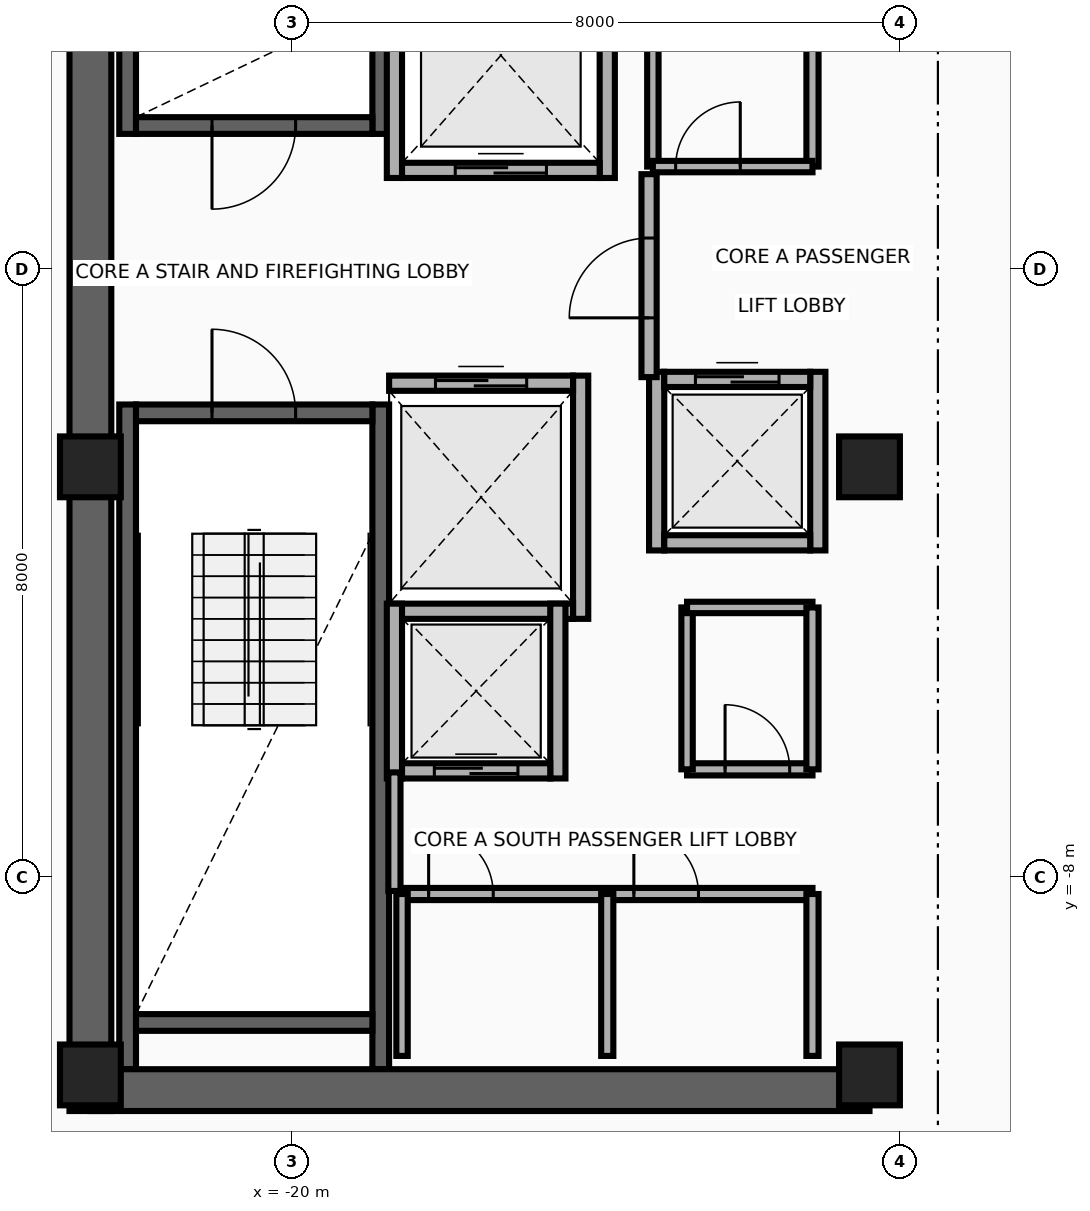
"""IFC4 building model, lengths in metres.
Left out: names, types, materials, properties, quantities, classifications, styles, units other than length and angle.
Written with IfcOpenShell. Run it as: python <this file> out.ifc"""

import sys

from ifc_helpers import new_model, si_unit, direction, frame, frame_2d, origin, origin_2d, place, context, subcontext, project, spatial, rectangle, extrude, source, transform, mapped, element, fill, save


model = new_model("IFC4")
c1 = context("Model", 3, precision=1e-05, world=origin(), true_north=direction((0.0, 1.0)))
c2 = subcontext(c1, "Body", "Model", "MODEL_VIEW")
j1 = project(units=[si_unit("LENGTHUNIT", "METRE"), si_unit("PLANEANGLEUNIT", "RADIAN")], contexts=[c1])
p1 = place(None, origin())
s1 = spatial("IfcSite", under=j1, at=p1, CompositionType="ELEMENT")
p2 = place(p1, origin())
s2 = spatial("IfcBuilding", under=s1, at=p2, CompositionType="ELEMENT")
p3 = place(p2, frame((0.0, 0.0, 273.0)))
s3 = spatial("IfcBuildingStorey", under=s2, at=p3, CompositionType="ELEMENT", Elevation=273.0)
for number, where, z_axis, x_axis in (
    (1, (-22.16, 1.78, 0.0), (0.0, 0.0, 1.0), (0.0, 1.0, 0.0)),
    (2, (-18.83, 1.78, 0.0), (0.0, 0.0, 1.0), (0.0, 1.0, 0.0)),
):
    element("IfcWall", number, at=place(p3, frame(where, z_axis=z_axis, x_axis=x_axis)), inside=s3, PredefinedType="SHEAR", context=c2, shape_type="SweptSolid", body=[
        extrude(rectangle(XDim=8.745, YDim=0.22, at=frame_2d((4.373, 0.0))), origin(), (0.0, 0.0, 1.0), 3.26),
    ])
p4 = place(p3, frame((-22.05, 1.89, 0.0), z_axis=(0.0, 0.0, 1.0), x_axis=(1.0, 0.0, 0.0)))
e3 = element("IfcWall", 3, at=p4, inside=s3, PredefinedType="SHEAR", context=c2, shape_type="SweptSolid", body=[
    extrude(rectangle(XDim=3.11, YDim=0.22, at=frame_2d((1.555, 0.0))), origin(), (0.0, 0.0, 1.0), 3.26),
])
p5 = place(p4, frame((1.0, 0.0, 0.0)))
e4 = element("IfcOpeningElement", 4, at=p5, cuts=e3, PredefinedType="OPENING", context=c2, shape_type="SweptSolid", body=[
    extrude(rectangle(XDim=1.1, YDim=2.15, at=frame_2d((0.55, 1.075))), frame((0.0, 0.125, 0.0), z_axis=(0.0, -1.0, 0.0), x_axis=(1.0, 0.0, 0.0)), (0.0, 0.0, 1.0), 0.25),
])
for number, where, z_axis, x_axis in (
    (5, (-22.16, -10.525, 0.0), (0.0, 0.0, 1.0), (0.0, 1.0, 0.0)),
    (6, (-18.83, -10.525, 0.0), (0.0, 0.0, 1.0), (0.0, 1.0, 0.0)),
):
    element("IfcWall", number, at=place(p3, frame(where, z_axis=z_axis, x_axis=x_axis)), inside=s3, PredefinedType="SHEAR", context=c2, shape_type="SweptSolid", body=[
        extrude(rectangle(XDim=8.745, YDim=0.22, at=frame_2d((4.373, 0.0))), origin(), (0.0, 0.0, 1.0), 3.26),
    ])
p6 = place(p3, frame((-22.05, -9.91, 0.0), z_axis=(0.0, 0.0, 1.0), x_axis=(1.0, 0.0, 0.0)))
e7 = element("IfcWall", 7, at=p6, inside=s3, PredefinedType="SHEAR", context=c2, shape_type="SweptSolid", body=[
    extrude(rectangle(XDim=3.11, YDim=0.22, at=frame_2d((1.555, 0.0))), origin(), (0.0, 0.0, 1.0), 3.26),
])
p7 = place(p3, frame((-22.05, -1.89, 0.0), z_axis=(0.0, 0.0, 1.0), x_axis=(1.0, 0.0, 0.0)))
e8 = element("IfcWall", 8, at=p7, inside=s3, PredefinedType="SHEAR", context=c2, shape_type="SweptSolid", body=[
    extrude(rectangle(XDim=3.11, YDim=0.22, at=frame_2d((1.555, 0.0))), origin(), (0.0, 0.0, 1.0), 3.26),
])
p8 = place(p7, frame((1.0, 0.0, 0.0)))
e9 = element("IfcOpeningElement", 9, at=p8, cuts=e8, PredefinedType="OPENING", context=c2, shape_type="SweptSolid", body=[
    extrude(rectangle(XDim=1.1, YDim=2.15, at=frame_2d((0.55, 1.075))), frame((0.0, 0.125, 0.0), z_axis=(0.0, -1.0, 0.0), x_axis=(1.0, 0.0, 0.0)), (0.0, 0.0, 1.0), 0.25),
])
p9 = place(p3, frame((-22.65, -11.075, 0.0), z_axis=(0.0, 0.0, 1.0), x_axis=(0.0, 1.0, 0.0)))
e10 = element("IfcWall", 10, at=p9, inside=s3, PredefinedType="SHEAR", context=c2, shape_type="SweptSolid", body=[
    extrude(rectangle(XDim=22.15, YDim=0.55, at=frame_2d((11.075, 0.0))), origin(), (0.0, 0.0, 1.0), 3.26),
])
p10 = place(p3, frame((-22.65, -10.8, 0.0), z_axis=(0.0, 0.0, 1.0), x_axis=(1.0, 0.0, 0.0)))
e11 = element("IfcWall", 11, at=p10, inside=s3, PredefinedType="SHEAR", context=c2, shape_type="SweptSolid", body=[
    extrude(rectangle(XDim=10.25, YDim=0.55, at=frame_2d((5.125, 0.0))), origin(), (0.0, 0.0, 1.0), 3.26),
])
m1 = source(origin(), c2, "Body", "SweptSolid", [
    extrude(rectangle(XDim=0.8, YDim=0.8, at=origin_2d()), origin(), (0.0, 0.0, 1.0), 3.5),
])
for number, where, z_axis, x_axis in (
    (12, (-22.65, -10.6, 0.0), (0.0, 0.0, 1.0), (1.0, 0.0, 0.0)),
    (13, (-12.4, -10.6, 0.0), (0.0, 0.0, 1.0), (1.0, 0.0, 0.0)),
    (14, (-22.65, -2.6, 0.0), (0.0, 0.0, 1.0), (1.0, 0.0, 0.0)),
    (15, (-12.4, -2.6, 0.0), (0.0, 0.0, 1.0), (1.0, 0.0, 0.0)),
):
    element("IfcColumn", number, at=place(p3, frame(where, z_axis=z_axis, x_axis=x_axis)), inside=s3, PredefinedType="COLUMN", context=c2, shape_type="MappedRepresentation", body=[
        mapped(m1, transform((0.0, 0.0, 0.0), x_axis=(1.0, 0.0, 0.0), y_axis=(0.0, 1.0, 0.0), z_axis=(0.0, 0.0, 1.0), scale=1.0)),
    ])
for number, where, z_axis, x_axis in (
    (16, (-18.65, 1.2, 0.0), (0.0, 0.0, 1.0), (0.0, 1.0, 0.0)),
    (17, (-15.85, 1.2, 0.0), (0.0, 0.0, 1.0), (0.0, 1.0, 0.0)),
):
    element("IfcWall", number, at=place(p3, frame(where, z_axis=z_axis, x_axis=x_axis)), inside=s3, PredefinedType="MOVABLE", context=c2, shape_type="SweptSolid", body=[
        extrude(rectangle(XDim=3.225, YDim=0.2, at=frame_2d((1.613, 0.0))), origin(), (0.0, 0.0, 1.0), 3.26),
    ])
p11 = place(p3, frame((-18.55, 1.3, 0.0), z_axis=(0.0, 0.0, 1.0), x_axis=(1.0, 0.0, 0.0)))
e18 = element("IfcWall", 18, at=p11, inside=s3, PredefinedType="MOVABLE", context=c2, shape_type="SweptSolid", body=[
    extrude(rectangle(XDim=2.6, YDim=0.2, at=frame_2d((1.3, 0.0))), origin(), (0.0, 0.0, 1.0), 3.26),
])
p12 = place(p11, frame((0.7, 0.0, 0.0)))
e19 = element("IfcOpeningElement", 19, at=p12, cuts=e18, PredefinedType="OPENING", context=c2, shape_type="SweptSolid", body=[
    extrude(rectangle(XDim=1.2, YDim=2.1, at=frame_2d((0.6, 1.05))), frame((0.0, 0.115, 0.0), z_axis=(0.0, -1.0, 0.0), x_axis=(1.0, 0.0, 0.0)), (0.0, 0.0, 1.0), 0.23),
])
p13 = place(p3, frame((-16.2, -4.6, 0.0), z_axis=(0.0, 0.0, 1.0), x_axis=(0.0, 1.0, 0.0)))
e20 = element("IfcWall", 20, at=p13, inside=s3, PredefinedType="MOVABLE", context=c2, shape_type="SweptSolid", body=[
    extrude(rectangle(XDim=3.2, YDim=0.2, at=frame_2d((1.6, 0.0))), origin(), (0.0, 0.0, 1.0), 3.26),
])
p14 = place(p3, frame((-18.72, -4.5, 0.0), z_axis=(0.0, 0.0, 1.0), x_axis=(1.0, 0.0, 0.0)))
e21 = element("IfcWall", 21, at=p14, inside=s3, PredefinedType="MOVABLE", context=c2, shape_type="SweptSolid", body=[
    extrude(rectangle(XDim=2.42, YDim=0.2, at=frame_2d((1.21, 0.0))), origin(), (0.0, 0.0, 1.0), 3.26),
])
p15 = place(p3, frame((-18.72, -1.5, 0.0), z_axis=(0.0, 0.0, 1.0), x_axis=(1.0, 0.0, 0.0)))
e22 = element("IfcWall", 22, at=p15, inside=s3, PredefinedType="MOVABLE", context=c2, shape_type="SweptSolid", body=[
    extrude(rectangle(XDim=2.42, YDim=0.2, at=frame_2d((1.21, 0.0))), origin(), (0.0, 0.0, 1.0), 3.26),
])
p16 = place(p15, frame((0.61, 0.0, 0.0)))
e23 = element("IfcOpeningElement", 23, at=p16, cuts=e22, PredefinedType="OPENING", context=c2, shape_type="SweptSolid", body=[
    extrude(rectangle(XDim=1.2, YDim=2.1, at=frame_2d((0.6, 1.05))), frame((0.0, 0.115, 0.0), z_axis=(0.0, -1.0, 0.0), x_axis=(1.0, 0.0, 0.0)), (0.0, 0.0, 1.0), 0.23),
])
for number, where, z_axis, x_axis in (
    (24, (-18.65, -6.7, 0.0), (0.0, 0.0, 1.0), (0.0, 1.0, 0.0)),
    (25, (-16.5, -6.7, 0.0), (0.0, 0.0, 1.0), (0.0, 1.0, 0.0)),
):
    element("IfcWall", number, at=place(p3, frame(where, z_axis=z_axis, x_axis=x_axis)), inside=s3, PredefinedType="MOVABLE", context=c2, shape_type="SweptSolid", body=[
        extrude(rectangle(XDim=2.3, YDim=0.2, at=frame_2d((1.15, 0.0))), origin(), (0.0, 0.0, 1.0), 3.26),
    ])
p17 = place(p3, frame((-18.55, -6.6, 0.0), z_axis=(0.0, 0.0, 1.0), x_axis=(1.0, 0.0, 0.0)))
e26 = element("IfcWall", 26, at=p17, inside=s3, PredefinedType="MOVABLE", context=c2, shape_type="SweptSolid", body=[
    extrude(rectangle(XDim=1.95, YDim=0.2, at=frame_2d((0.975, 0.0))), origin(), (0.0, 0.0, 1.0), 3.26),
])
p18 = place(p17, frame((0.425, 0.0, 0.0)))
e27 = element("IfcOpeningElement", 27, at=p18, cuts=e26, PredefinedType="OPENING", context=c2, shape_type="SweptSolid", body=[
    extrude(rectangle(XDim=1.1, YDim=2.1, at=frame_2d((0.55, 1.05))), frame((0.0, 0.115, 0.0), z_axis=(0.0, -1.0, 0.0), x_axis=(1.0, 0.0, 0.0)), (0.0, 0.0, 1.0), 0.23),
])
for number, where, z_axis, x_axis in (
    (28, (-15.2, -3.7, 0.0), (0.0, 0.0, 1.0), (0.0, 1.0, 0.0)),
    (29, (-13.08, -3.7, 0.0), (0.0, 0.0, 1.0), (0.0, 1.0, 0.0)),
):
    element("IfcWall", number, at=place(p3, frame(where, z_axis=z_axis, x_axis=x_axis)), inside=s3, PredefinedType="MOVABLE", context=c2, shape_type="SweptSolid", body=[
        extrude(rectangle(XDim=2.35, YDim=0.2, at=frame_2d((1.175, 0.0))), origin(), (0.0, 0.0, 1.0), 3.26),
    ])
p19 = place(p3, frame((-15.1, -3.6, 0.0), z_axis=(0.0, 0.0, 1.0), x_axis=(1.0, 0.0, 0.0)))
e30 = element("IfcWall", 30, at=p19, inside=s3, PredefinedType="MOVABLE", context=c2, shape_type="SweptSolid", body=[
    extrude(rectangle(XDim=1.92, YDim=0.2, at=frame_2d((0.96, 0.0))), origin(), (0.0, 0.0, 1.0), 3.26),
])
p20 = place(p3, frame((-15.1, -1.45, 0.0), z_axis=(0.0, 0.0, 1.0), x_axis=(1.0, 0.0, 0.0)))
e31 = element("IfcWall", 31, at=p20, inside=s3, PredefinedType="MOVABLE", context=c2, shape_type="SweptSolid", body=[
    extrude(rectangle(XDim=1.92, YDim=0.2, at=frame_2d((0.96, 0.0))), origin(), (0.0, 0.0, 1.0), 3.26),
])
p21 = place(p20, frame((0.41, 0.0, 0.0)))
e32 = element("IfcOpeningElement", 32, at=p21, cuts=e31, PredefinedType="OPENING", context=c2, shape_type="SweptSolid", body=[
    extrude(rectangle(XDim=1.1, YDim=2.1, at=frame_2d((0.55, 1.05))), frame((0.0, 0.115, 0.0), z_axis=(0.0, -1.0, 0.0), x_axis=(1.0, 0.0, 0.0)), (0.0, 0.0, 1.0), 0.23),
])
p22 = place(p3, frame((-15.3, -1.42, 0.0), z_axis=(0.0, 0.0, 1.0), x_axis=(0.0, 1.0, 0.0)))
e33 = element("IfcWall", 33, at=p22, inside=s3, PredefinedType="PARTITIONING", context=c2, shape_type="SweptSolid", body=[
    extrude(rectangle(XDim=2.67, YDim=0.2, at=frame_2d((1.335, 0.0))), origin(), (0.0, 0.0, 1.0), 3.26),
])
p23 = place(p22, frame((0.78, 0.0, 0.0)))
e34 = element("IfcOpeningElement", 34, at=p23, cuts=e33, PredefinedType="OPENING", context=c2, shape_type="SweptSolid", body=[
    extrude(rectangle(XDim=1.05, YDim=2.15, at=frame_2d((0.525, 1.075))), frame((0.0, 0.115, 0.0), z_axis=(0.0, -1.0, 0.0), x_axis=(1.0, 0.0, 0.0)), (0.0, 0.0, 1.0), 0.23),
])
p24 = place(p3, frame((-18.65, -8.18, 0.0), z_axis=(0.0, 0.0, 1.0), x_axis=(0.0, 1.0, 0.0)))
e35 = element("IfcWall", 35, at=p24, inside=s3, PredefinedType="PARTITIONING", context=c2, shape_type="SweptSolid", body=[
    extrude(rectangle(XDim=1.56, YDim=0.16, at=frame_2d((0.78, 0.0))), origin(), (0.0, 0.0, 1.0), 3.26),
])
p25 = place(p3, frame((-18.55, -8.22, 0.0), z_axis=(0.0, 0.0, 1.0), x_axis=(1.0, 0.0, 0.0)))
e36 = element("IfcWall", 36, at=p25, inside=s3, PredefinedType="PARTITIONING", context=c2, shape_type="SweptSolid", body=[
    extrude(rectangle(XDim=5.4, YDim=0.16, at=frame_2d((2.7, 0.0))), origin(), (0.0, 0.0, 1.0), 3.26),
])
p26 = place(p25, frame((0.35, 0.0, 0.0)))
e37 = element("IfcOpeningElement", 37, at=p26, cuts=e36, PredefinedType="OPENING", context=c2, shape_type="SweptSolid", body=[
    extrude(rectangle(XDim=0.85, YDim=2.05, at=frame_2d((0.425, 1.025))), frame((0.0, 0.095, 0.0), z_axis=(0.0, -1.0, 0.0), x_axis=(1.0, 0.0, 0.0)), (0.0, 0.0, 1.0), 0.19),
])
p27 = place(p25, frame((3.05, 0.0, 0.0)))
e38 = element("IfcOpeningElement", 38, at=p27, cuts=e36, PredefinedType="OPENING", context=c2, shape_type="SweptSolid", body=[
    extrude(rectangle(XDim=0.85, YDim=2.05, at=frame_2d((0.425, 1.025))), frame((0.0, 0.095, 0.0), z_axis=(0.0, -1.0, 0.0), x_axis=(1.0, 0.0, 0.0)), (0.0, 0.0, 1.0), 0.19),
])
p28 = place(p3, frame((-18.55, -10.35, 0.0), z_axis=(0.0, 0.0, 1.0), x_axis=(0.0, 1.0, 0.0)))
e39 = element("IfcWall", 39, at=p28, inside=s3, PredefinedType="PARTITIONING", context=c2, shape_type="SweptSolid", body=[
    extrude(rectangle(XDim=2.13, YDim=0.15, at=frame_2d((1.065, 0.0))), origin(), (0.0, 0.0, 1.0), 3.26),
])
for number, where, z_axis, x_axis in (
    (40, (-13.15, -10.35, 0.0), (0.0, 0.0, 1.0), (0.0, 1.0, 0.0)),
    (41, (-15.85, -10.35, 0.0), (0.0, 0.0, 1.0), (0.0, 1.0, 0.0)),
):
    element("IfcWall", number, at=place(p3, frame(where, z_axis=z_axis, x_axis=x_axis)), inside=s3, PredefinedType="PARTITIONING", context=c2, shape_type="SweptSolid", body=[
        extrude(rectangle(XDim=2.13, YDim=0.16, at=frame_2d((1.065, 0.0))), origin(), (0.0, 0.0, 1.0), 3.26),
    ])
p29 = place(p3, frame((-14.8, -6.58, 0.0), z_axis=(0.0, 0.0, 1.0), x_axis=(1.0, 0.0, 0.0)))
e42 = element("IfcWall", 42, at=p29, inside=s3, PredefinedType="PARTITIONING", context=c2, shape_type="SweptSolid", body=[
    extrude(rectangle(XDim=1.65, YDim=0.16, at=frame_2d((0.825, 0.0))), origin(), (0.0, 0.0, 1.0), 3.26),
])
p30 = place(p29, frame((0.5, 0.0, 0.0)))
e43 = element("IfcOpeningElement", 43, at=p30, cuts=e42, PredefinedType="OPENING", context=c2, shape_type="SweptSolid", body=[
    extrude(rectangle(XDim=0.85, YDim=2.05, at=frame_2d((0.425, 1.025))), frame((0.0, 0.095, 0.0), z_axis=(0.0, -1.0, 0.0), x_axis=(1.0, 0.0, 0.0)), (0.0, 0.0, 1.0), 0.19),
])
p31 = place(p3, frame((-14.8, -6.58, 0.0), z_axis=(0.0, 0.0, 1.0), x_axis=(0.0, 1.0, 0.0)))
e44 = element("IfcWall", 44, at=p31, inside=s3, PredefinedType="PARTITIONING", context=c2, shape_type="SweptSolid", body=[
    extrude(rectangle(XDim=2.13, YDim=0.15, at=frame_2d((1.065, 0.0))), origin(), (0.0, 0.0, 1.0), 3.26),
])
p32 = place(p3, frame((-14.8, -4.45, 0.0), z_axis=(0.0, 0.0, 1.0), x_axis=(1.0, 0.0, 0.0)))
e45 = element("IfcWall", 45, at=p32, inside=s3, PredefinedType="PARTITIONING", context=c2, shape_type="SweptSolid", body=[
    extrude(rectangle(XDim=1.65, YDim=0.15, at=frame_2d((0.825, 0.0))), origin(), (0.0, 0.0, 1.0), 3.26),
])
p33 = place(p3, frame((-13.15, -6.58, 0.0), z_axis=(0.0, 0.0, 1.0), x_axis=(0.0, 1.0, 0.0)))
e46 = element("IfcWall", 46, at=p33, inside=s3, PredefinedType="PARTITIONING", context=c2, shape_type="SweptSolid", body=[
    extrude(rectangle(XDim=2.13, YDim=0.16, at=frame_2d((1.065, 0.0))), origin(), (0.0, 0.0, 1.0), 3.26),
])
p34 = place(p3, frame((-13.15, 1.35, 0.0), z_axis=(0.0, 0.0, 1.0), x_axis=(0.0, 1.0, 0.0)))
e47 = element("IfcWall", 47, at=p34, inside=s3, PredefinedType="PARTITIONING", context=c2, shape_type="SweptSolid", body=[
    extrude(rectangle(XDim=1.95, YDim=0.16, at=frame_2d((0.975, 0.0))), origin(), (0.0, 0.0, 1.0), 3.26),
])
p35 = place(p3, frame((-15.25, 1.35, 0.0), z_axis=(0.0, 0.0, 1.0), x_axis=(0.0, 1.0, 0.0)))
e48 = element("IfcWall", 48, at=p35, inside=s3, PredefinedType="PARTITIONING", context=c2, shape_type="SweptSolid", body=[
    extrude(rectangle(XDim=1.95, YDim=0.15, at=frame_2d((0.975, 0.0))), origin(), (0.0, 0.0, 1.0), 3.26),
])
p36 = place(p3, frame((-15.25, 1.35, 0.0), z_axis=(0.0, 0.0, 1.0), x_axis=(1.0, 0.0, 0.0)))
e49 = element("IfcWall", 49, at=p36, inside=s3, PredefinedType="PARTITIONING", context=c2, shape_type="SweptSolid", body=[
    extrude(rectangle(XDim=2.1, YDim=0.15, at=frame_2d((1.05, 0.0))), origin(), (0.0, 0.0, 1.0), 3.26),
])
p37 = place(p36, frame((0.3, 0.0, 0.0)))
e50 = element("IfcOpeningElement", 50, at=p37, cuts=e49, PredefinedType="OPENING", context=c2, shape_type="SweptSolid", body=[
    extrude(rectangle(XDim=0.85, YDim=2.05, at=frame_2d((0.425, 1.025))), frame((0.0, 0.09, 0.0), z_axis=(0.0, -1.0, 0.0), x_axis=(1.0, 0.0, 0.0)), (0.0, 0.0, 1.0), 0.18),
])
p38 = place(p12, origin())
e51 = element("IfcDoor", 51, at=p38, inside=s3, OperationType="DOUBLE_DOOR_SLIDING", PredefinedType="DOOR", context=c2, shape_type="SweptSolid", body=[
    extrude(rectangle(XDim=1.2, YDim=2.1, at=frame_2d((0.6, 1.05))), frame((0.0, 0.025, 0.0), z_axis=(0.0, -1.0, 0.0), x_axis=(1.0, 0.0, 0.0)), (0.0, 0.0, 1.0), 0.05),
])
fill(e19, e51)
p39 = place(p16, origin())
e52 = element("IfcDoor", 52, at=p39, inside=s3, OperationType="DOUBLE_DOOR_SLIDING", PredefinedType="DOOR", context=c2, shape_type="SweptSolid", body=[
    extrude(rectangle(XDim=1.2, YDim=2.1, at=frame_2d((0.6, 1.05))), frame((0.0, 0.025, 0.0), z_axis=(0.0, -1.0, 0.0), x_axis=(1.0, 0.0, 0.0)), (0.0, 0.0, 1.0), 0.05),
])
fill(e23, e52)
p40 = place(p18, origin())
e53 = element("IfcDoor", 53, at=p40, inside=s3, OperationType="DOUBLE_DOOR_SLIDING", PredefinedType="DOOR", context=c2, shape_type="SweptSolid", body=[
    extrude(rectangle(XDim=1.1, YDim=2.1, at=frame_2d((0.55, 1.05))), frame((0.0, 0.025, 0.0), z_axis=(0.0, -1.0, 0.0), x_axis=(1.0, 0.0, 0.0)), (0.0, 0.0, 1.0), 0.05),
])
fill(e27, e53)
p41 = place(p21, origin())
e54 = element("IfcDoor", 54, at=p41, inside=s3, OperationType="DOUBLE_DOOR_SLIDING", PredefinedType="DOOR", context=c2, shape_type="SweptSolid", body=[
    extrude(rectangle(XDim=1.1, YDim=2.1, at=frame_2d((0.55, 1.05))), frame((0.0, 0.025, 0.0), z_axis=(0.0, -1.0, 0.0), x_axis=(1.0, 0.0, 0.0)), (0.0, 0.0, 1.0), 0.05),
])
fill(e32, e54)
p42 = place(p23, origin())
e55 = element("IfcDoor", 55, at=p42, inside=s3, OperationType="SINGLE_SWING_RIGHT", PredefinedType="DOOR", context=c2, shape_type="SweptSolid", body=[
    extrude(rectangle(XDim=1.05, YDim=2.15, at=frame_2d((0.525, 1.075))), frame((0.0, 0.025, 0.0), z_axis=(0.0, -1.0, 0.0), x_axis=(1.0, 0.0, 0.0)), (0.0, 0.0, 1.0), 0.05),
])
fill(e34, e55)
p43 = place(p5, frame((1.1, 0.0, 0.0), z_axis=(0.0, 0.0, 1.0), x_axis=(-1.0, 0.0, 0.0)))
e56 = element("IfcDoor", 56, at=p43, inside=s3, OperationType="SINGLE_SWING_LEFT", PredefinedType="DOOR", context=c2, shape_type="SweptSolid", body=[
    extrude(rectangle(XDim=1.1, YDim=2.15, at=frame_2d((0.55, 1.075))), frame((0.0, 0.025, 0.0), z_axis=(0.0, -1.0, 0.0), x_axis=(1.0, 0.0, 0.0)), (0.0, 0.0, 1.0), 0.05),
])
fill(e4, e56)
p44 = place(p8, origin())
e57 = element("IfcDoor", 57, at=p44, inside=s3, OperationType="SINGLE_SWING_RIGHT", PredefinedType="DOOR", context=c2, shape_type="SweptSolid", body=[
    extrude(rectangle(XDim=1.1, YDim=2.15, at=frame_2d((0.55, 1.075))), frame((0.0, 0.025, 0.0), z_axis=(0.0, -1.0, 0.0), x_axis=(1.0, 0.0, 0.0)), (0.0, 0.0, 1.0), 0.05),
])
fill(e9, e57)
p45 = place(p26, origin())
e58 = element("IfcDoor", 58, at=p45, inside=s3, OperationType="SINGLE_SWING_LEFT", PredefinedType="DOOR", context=c2, shape_type="SweptSolid", body=[
    extrude(rectangle(XDim=0.85, YDim=2.05, at=frame_2d((0.425, 1.025))), frame((0.0, 0.025, 0.0), z_axis=(0.0, -1.0, 0.0), x_axis=(1.0, 0.0, 0.0)), (0.0, 0.0, 1.0), 0.05),
])
fill(e37, e58)
p46 = place(p27, origin())
e59 = element("IfcDoor", 59, at=p46, inside=s3, OperationType="SINGLE_SWING_RIGHT", PredefinedType="DOOR", context=c2, shape_type="SweptSolid", body=[
    extrude(rectangle(XDim=0.85, YDim=2.05, at=frame_2d((0.425, 1.025))), frame((0.0, 0.025, 0.0), z_axis=(0.0, -1.0, 0.0), x_axis=(1.0, 0.0, 0.0)), (0.0, 0.0, 1.0), 0.05),
])
fill(e38, e59)
p47 = place(p30, origin())
e60 = element("IfcDoor", 60, at=p47, inside=s3, OperationType="SINGLE_SWING_LEFT", PredefinedType="DOOR", context=c2, shape_type="SweptSolid", body=[
    extrude(rectangle(XDim=0.85, YDim=2.05, at=frame_2d((0.425, 1.025))), frame((0.0, 0.025, 0.0), z_axis=(0.0, -1.0, 0.0), x_axis=(1.0, 0.0, 0.0)), (0.0, 0.0, 1.0), 0.05),
])
fill(e43, e60)
p48 = place(p37, origin())
e61 = element("IfcDoor", 61, at=p48, inside=s3, OperationType="SINGLE_SWING_RIGHT", PredefinedType="DOOR", context=c2, shape_type="SweptSolid", body=[
    extrude(rectangle(XDim=0.85, YDim=2.05, at=frame_2d((0.425, 1.025))), frame((0.0, 0.025, 0.0), z_axis=(0.0, -1.0, 0.0), x_axis=(1.0, 0.0, 0.0)), (0.0, 0.0, 1.0), 0.05),
])
fill(e50, e61)
save(model, sys.argv[1])
